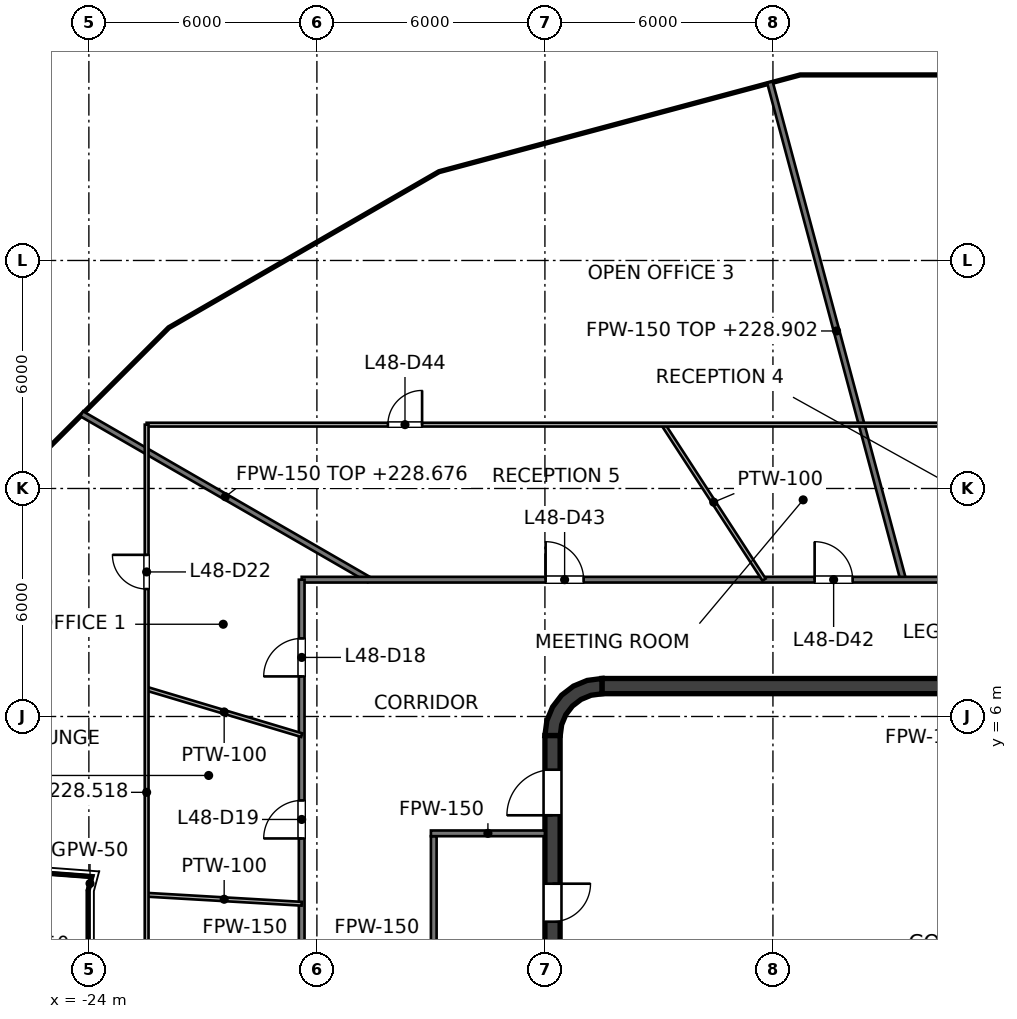
"""IFC4 building model, lengths in metres.
Left out: names, types, materials, properties, quantities, classifications, styles, units other than length and angle.
Written with IfcOpenShell. Run it as: python <this file> out.ifc"""

import sys

from ifc_helpers import new_model, si_unit, direction, frame, frame_2d, origin, place, context, subcontext, project, spatial, polyline, rectangle, outline, extrude, element, fill, save


model = new_model("IFC4")
c1 = context("Model", 3, precision=1e-05, world=origin(), true_north=direction((0.0, 1.0)))
c2 = subcontext(c1, "Body", "Model", "MODEL_VIEW")
j1 = project(units=[si_unit("LENGTHUNIT", "METRE"), si_unit("PLANEANGLEUNIT", "RADIAN")], contexts=[c1])
p1 = place(None, origin())
s1 = spatial("IfcSite", under=j1, at=p1, CompositionType="ELEMENT")
p2 = place(p1, origin())
s2 = spatial("IfcBuilding", under=s1, at=p2, CompositionType="ELEMENT")
p3 = place(p2, frame((0.0, 0.0, 225.6)))
s3 = spatial("IfcBuildingStorey", under=s2, at=p3, CompositionType="ELEMENT", Elevation=225.6)
p4 = place(p3, frame((-10.5, 6.8, 0.0), z_axis=(0.0, 0.0, 1.0), x_axis=(1.0, 0.0, 0.0)))
e1 = element("IfcWall", 1, at=p4, inside=s3, PredefinedType="SHEAR", context=c2, shape_type="SweptSolid", body=[
    extrude(rectangle(XDim=21.0, YDim=0.4, at=frame_2d((10.5, 0.0))), origin(), (0.0, 0.0, 1.0), 4.0),
])
p5 = place(p3, frame((-11.8, -5.5, 0.0), z_axis=(0.0, 0.0, 1.0), x_axis=(0.0, 1.0, 0.0)))
e2 = element("IfcWall", 2, at=p5, inside=s3, PredefinedType="SHEAR", context=c2, shape_type="SweptSolid", body=[
    extrude(rectangle(XDim=11.0, YDim=0.4, at=frame_2d((5.5, 0.0))), origin(), (0.0, 0.0, 1.0), 4.0),
])
p6 = place(p5, frame((3.2, 0.0, 0.0)))
e3 = element("IfcOpeningElement", 3, at=p6, cuts=e2, PredefinedType="OPENING", context=c2, shape_type="SweptSolid", body=[
    extrude(rectangle(XDim=1.0, YDim=2.1, at=frame_2d((0.5, 1.05))), frame((0.0, 0.2, 0.0), z_axis=(0.0, -1.0, 0.0), x_axis=(1.0, 0.0, 0.0)), (0.0, 0.0, 1.0), 0.4),
])
p7 = place(p5, frame((6.1, 0.0, 0.0)))
e4 = element("IfcOpeningElement", 4, at=p7, cuts=e2, PredefinedType="OPENING", context=c2, shape_type="SweptSolid", body=[
    extrude(rectangle(XDim=1.0, YDim=2.1, at=frame_2d((0.5, 1.05))), frame((0.0, 0.2, 0.0), z_axis=(0.0, -1.0, 0.0), x_axis=(1.0, 0.0, 0.0)), (0.0, 0.0, 1.0), 0.4),
])
p8 = place(p5, frame((0.9, 0.0, 0.0)))
e5 = element("IfcOpeningElement", 5, at=p8, cuts=e2, PredefinedType="OPENING", context=c2, shape_type="SweptSolid", body=[
    extrude(rectangle(XDim=1.2, YDim=2.1, at=frame_2d((0.6, 1.05))), frame((0.0, 0.2, 0.0), z_axis=(0.0, -1.0, 0.0), x_axis=(1.0, 0.0, 0.0)), (0.0, 0.0, 1.0), 0.4),
])
p9 = place(p5, frame((8.9, 0.0, 0.0)))
e6 = element("IfcOpeningElement", 6, at=p9, cuts=e2, PredefinedType="OPENING", context=c2, shape_type="SweptSolid", body=[
    extrude(rectangle(XDim=1.2, YDim=2.1, at=frame_2d((0.6, 1.05))), frame((0.0, 0.2, 0.0), z_axis=(0.0, -1.0, 0.0), x_axis=(1.0, 0.0, 0.0)), (0.0, 0.0, 1.0), 0.4),
])
p10 = place(p3, origin())
e7 = element("IfcWall", 7, at=p10, inside=s3, PredefinedType="SHEAR", context=c2, shape_type="SweptSolid", body=[
    extrude(outline(polyline([(-12.0, 5.5), (-11.596, 5.5), (-11.559, 5.784), (-11.45, 6.048), (-11.275, 6.275), (-11.048, 6.45), (-10.784, 6.559), (-10.5, 6.596), (-10.5, 7.0), (-10.888, 6.949), (-11.25, 6.799), (-11.561, 6.561), (-11.799, 6.25), (-11.949, 5.888), (-12.0, 5.5)])), origin(), (0.0, 0.0, 1.0), 4.0),
])
p11 = place(p3, frame((-9.0, 4.1, 0.0), z_axis=(0.0, 0.0, 1.0), x_axis=(0.0, 1.0, 0.0)))
e8 = element("IfcWall", 8, at=p11, inside=s3, PredefinedType="SOLIDWALL", context=c2, shape_type="SweptSolid", body=[
    extrude(rectangle(XDim=2.5, YDim=0.25, at=frame_2d((1.25, 0.0))), origin(), (0.0, 0.0, 1.0), 3.85),
])
p12 = place(p11, frame((0.65, 0.0, 0.0)))
e9 = element("IfcOpeningElement", 9, at=p12, cuts=e8, PredefinedType="OPENING", context=c2, shape_type="SweptSolid", body=[
    extrude(rectangle(XDim=1.2, YDim=2.1, at=frame_2d((0.6, 1.05))), frame((0.0, 0.125, 0.0), z_axis=(0.0, -1.0, 0.0), x_axis=(1.0, 0.0, 0.0)), (0.0, 0.0, 1.0), 0.25),
])
p13 = place(p3, frame((-3.15, 4.1, 0.0), z_axis=(0.0, 0.0, 1.0), x_axis=(0.0, 1.0, 0.0)))
e10 = element("IfcWall", 10, at=p13, inside=s3, PredefinedType="SOLIDWALL", context=c2, shape_type="SweptSolid", body=[
    extrude(rectangle(XDim=2.5, YDim=0.25, at=frame_2d((1.25, 0.0))), origin(), (0.0, 0.0, 1.0), 3.85),
])
p14 = place(p3, frame((-9.125, 1.525, 0.0), z_axis=(0.0, 0.0, 1.0), x_axis=(1.0, 0.0, 0.0)))
e11 = element("IfcWall", 11, at=p14, inside=s3, PredefinedType="SOLIDWALL", context=c2, shape_type="SweptSolid", body=[
    extrude(rectangle(XDim=8.35, YDim=0.25, at=frame_2d((4.175, 0.0))), origin(), (0.0, 0.0, 1.0), 3.85),
])
p15 = place(p14, frame((0.925, 0.0, 0.0)))
e12 = element("IfcOpeningElement", 12, at=p15, cuts=e11, PredefinedType="OPENING", context=c2, shape_type="SweptSolid", body=[
    extrude(rectangle(XDim=1.1, YDim=2.1, at=frame_2d((0.55, 1.05))), frame((0.0, 0.125, 0.0), z_axis=(0.0, -1.0, 0.0), x_axis=(1.0, 0.0, 0.0)), (0.0, 0.0, 1.0), 0.25),
])
p16 = place(p14, frame((3.625, 0.0, 0.0)))
e13 = element("IfcOpeningElement", 13, at=p16, cuts=e11, PredefinedType="OPENING", context=c2, shape_type="SweptSolid", body=[
    extrude(rectangle(XDim=1.1, YDim=2.1, at=frame_2d((0.55, 1.05))), frame((0.0, 0.125, 0.0), z_axis=(0.0, -1.0, 0.0), x_axis=(1.0, 0.0, 0.0)), (0.0, 0.0, 1.0), 0.25),
])
p17 = place(p14, frame((6.325, 0.0, 0.0)))
e14 = element("IfcOpeningElement", 14, at=p17, cuts=e11, PredefinedType="OPENING", context=c2, shape_type="SweptSolid", body=[
    extrude(rectangle(XDim=1.1, YDim=2.1, at=frame_2d((0.55, 1.05))), frame((0.0, 0.125, 0.0), z_axis=(0.0, -1.0, 0.0), x_axis=(1.0, 0.0, 0.0)), (0.0, 0.0, 1.0), 0.25),
])
p18 = place(p3, frame((-9.125, 3.975, 0.0), z_axis=(0.0, 0.0, 1.0), x_axis=(1.0, 0.0, 0.0)))
e15 = element("IfcWall", 15, at=p18, inside=s3, PredefinedType="SOLIDWALL", context=c2, shape_type="SweptSolid", body=[
    extrude(rectangle(XDim=8.35, YDim=0.25, at=frame_2d((4.175, 0.0))), origin(), (0.0, 0.0, 1.0), 3.85),
])
for number, where, z_axis, x_axis in (
    (16, (-9.0, 1.65, 0.0), (0.0, 0.0, 1.0), (0.0, 1.0, 0.0)),
    (17, (-6.3, 1.65, 0.0), (0.0, 0.0, 1.0), (0.0, 1.0, 0.0)),
    (18, (-3.6, 1.65, 0.0), (0.0, 0.0, 1.0), (0.0, 1.0, 0.0)),
):
    element("IfcWall", number, at=place(p3, frame(where, z_axis=z_axis, x_axis=x_axis)), inside=s3, PredefinedType="SOLIDWALL", context=c2, shape_type="SweptSolid", body=[
        extrude(rectangle(XDim=2.2, YDim=0.25, at=frame_2d((1.1, 0.0))), origin(), (0.0, 0.0, 1.0), 3.85),
    ])
p19 = place(p3, frame((-14.925, -2.85, 0.0), z_axis=(0.0, 0.0, 1.0), x_axis=(0.0, 1.0, 0.0)))
e19 = element("IfcWall", 19, at=p19, inside=s3, PredefinedType="PARTITIONING", context=c2, shape_type="SweptSolid", body=[
    extrude(rectangle(XDim=5.7, YDim=0.15, at=frame_2d((2.85, 0.0))), origin(), (0.0, 0.0, 1.0), 2.918),
])
p20 = place(p3, frame((-15.0, 2.925, 0.0), z_axis=(0.0, 0.0, 1.0), x_axis=(1.0, 0.0, 0.0)))
e20 = element("IfcWall", 20, at=p20, inside=s3, PredefinedType="PARTITIONING", context=c2, shape_type="SweptSolid", body=[
    extrude(rectangle(XDim=3.0, YDim=0.15, at=frame_2d((1.5, 0.0))), origin(), (0.0, 0.0, 1.0), 2.918),
])
p21 = place(p3, frame((-6.08, 22.69, 0.0), z_axis=(0.0, 0.0, 1.0), x_axis=(0.258842041415, -0.965919664152, 0.0)))
e21 = element("IfcWall", 21, at=p21, inside=s3, PredefinedType="PARTITIONING", context=c2, shape_type="SweptSolid", body=[
    extrude(rectangle(XDim=13.552, YDim=0.15, at=frame_2d((6.776, 0.0))), origin(), (0.0, 0.0, 1.0), 3.302),
])
p22 = place(p3, frame((-24.19, 13.966, 0.0), z_axis=(0.0, 0.0, 1.0), x_axis=(0.866042650443, -0.499970126722, 0.0)))
e22 = element("IfcWall", 22, at=p22, inside=s3, PredefinedType="PARTITIONING", context=c2, shape_type="SweptSolid", body=[
    extrude(rectangle(XDim=8.732, YDim=0.15, at=frame_2d((4.366, 0.0))), origin(), (0.0, 0.0, 1.0), 3.076),
])
p23 = place(p3, frame((-18.4, 9.6, 0.0), z_axis=(0.0, 0.0, 1.0), x_axis=(1.0, 0.0, 0.0)))
e23 = element("IfcWall", 23, at=p23, inside=s3, PredefinedType="PARTITIONING", context=c2, shape_type="SweptSolid", body=[
    extrude(rectangle(XDim=36.8, YDim=0.15, at=frame_2d((18.4, 0.0))), origin(), (0.0, 0.0, 1.0), 2.927),
])
p24 = place(p23, frame((30.793, 0.0, 0.0)))
e24 = element("IfcOpeningElement", 24, at=p24, cuts=e23, PredefinedType="OPENING", context=c2, shape_type="SweptSolid", body=[
    extrude(rectangle(XDim=1.0, YDim=2.1, at=frame_2d((0.5, 1.05))), frame((0.0, 0.075, 0.0), z_axis=(0.0, -1.0, 0.0), x_axis=(1.0, 0.0, 0.0)), (0.0, 0.0, 1.0), 0.15),
])
p25 = place(p23, frame((24.84, 0.0, 0.0)))
e25 = element("IfcOpeningElement", 25, at=p25, cuts=e23, PredefinedType="OPENING", context=c2, shape_type="SweptSolid", body=[
    extrude(rectangle(XDim=1.0, YDim=2.1, at=frame_2d((0.5, 1.05))), frame((0.0, 0.075, 0.0), z_axis=(0.0, -1.0, 0.0), x_axis=(1.0, 0.0, 0.0)), (0.0, 0.0, 1.0), 0.15),
])
p26 = place(p23, frame((21.106, 0.0, 0.0)))
e26 = element("IfcOpeningElement", 26, at=p26, cuts=e23, PredefinedType="OPENING", context=c2, shape_type="SweptSolid", body=[
    extrude(rectangle(XDim=1.0, YDim=2.1, at=frame_2d((0.5, 1.05))), frame((0.0, 0.075, 0.0), z_axis=(0.0, -1.0, 0.0), x_axis=(1.0, 0.0, 0.0)), (0.0, 0.0, 1.0), 0.15),
])
p27 = place(p23, frame((17.46, 0.0, 0.0)))
e27 = element("IfcOpeningElement", 27, at=p27, cuts=e23, PredefinedType="OPENING", context=c2, shape_type="SweptSolid", body=[
    extrude(rectangle(XDim=1.0, YDim=2.1, at=frame_2d((0.5, 1.05))), frame((0.0, 0.075, 0.0), z_axis=(0.0, -1.0, 0.0), x_axis=(1.0, 0.0, 0.0)), (0.0, 0.0, 1.0), 0.15),
])
p28 = place(p23, frame((13.497, 0.0, 0.0)))
e28 = element("IfcOpeningElement", 28, at=p28, cuts=e23, PredefinedType="OPENING", context=c2, shape_type="SweptSolid", body=[
    extrude(rectangle(XDim=1.0, YDim=2.1, at=frame_2d((0.5, 1.05))), frame((0.0, 0.075, 0.0), z_axis=(0.0, -1.0, 0.0), x_axis=(1.0, 0.0, 0.0)), (0.0, 0.0, 1.0), 0.15),
])
p29 = place(p23, frame((6.418, 0.0, 0.0)))
e29 = element("IfcOpeningElement", 29, at=p29, cuts=e23, PredefinedType="OPENING", context=c2, shape_type="SweptSolid", body=[
    extrude(rectangle(XDim=1.0, YDim=2.1, at=frame_2d((0.5, 1.05))), frame((0.0, 0.075, 0.0), z_axis=(0.0, -1.0, 0.0), x_axis=(1.0, 0.0, 0.0)), (0.0, 0.0, 1.0), 0.15),
])
p30 = place(p3, frame((-18.4, -9.6, 0.0), z_axis=(0.0, 0.0, 1.0), x_axis=(0.0, 1.0, 0.0)))
e30 = element("IfcWall", 30, at=p30, inside=s3, PredefinedType="PARTITIONING", context=c2, shape_type="SweptSolid", body=[
    extrude(rectangle(XDim=19.2, YDim=0.15, at=frame_2d((9.6, 0.0))), origin(), (0.0, 0.0, 1.0), 2.918),
])
p31 = place(p30, frame((16.655, 0.0, 0.0)))
e31 = element("IfcOpeningElement", 31, at=p31, cuts=e30, PredefinedType="OPENING", context=c2, shape_type="SweptSolid", body=[
    extrude(rectangle(XDim=1.0, YDim=2.1, at=frame_2d((0.5, 1.05))), frame((0.0, 0.075, 0.0), z_axis=(0.0, -1.0, 0.0), x_axis=(1.0, 0.0, 0.0)), (0.0, 0.0, 1.0), 0.15),
])
p32 = place(p30, frame((12.39, 0.0, 0.0)))
e32 = element("IfcOpeningElement", 32, at=p32, cuts=e30, PredefinedType="OPENING", context=c2, shape_type="SweptSolid", body=[
    extrude(rectangle(XDim=1.0, YDim=2.1, at=frame_2d((0.5, 1.05))), frame((0.0, 0.075, 0.0), z_axis=(0.0, -1.0, 0.0), x_axis=(1.0, 0.0, 0.0)), (0.0, 0.0, 1.0), 0.15),
])
p33 = place(p30, frame((7.963, 0.0, 0.0)))
e33 = element("IfcOpeningElement", 33, at=p33, cuts=e30, PredefinedType="OPENING", context=c2, shape_type="SweptSolid", body=[
    extrude(rectangle(XDim=1.0, YDim=2.1, at=frame_2d((0.5, 1.05))), frame((0.0, 0.075, 0.0), z_axis=(0.0, -1.0, 0.0), x_axis=(1.0, 0.0, 0.0)), (0.0, 0.0, 1.0), 0.15),
])
p34 = place(p30, frame((2.627, 0.0, 0.0)))
e34 = element("IfcOpeningElement", 34, at=p34, cuts=e30, PredefinedType="OPENING", context=c2, shape_type="SweptSolid", body=[
    extrude(rectangle(XDim=1.0, YDim=2.1, at=frame_2d((0.5, 1.05))), frame((0.0, 0.075, 0.0), z_axis=(0.0, -1.0, 0.0), x_axis=(1.0, 0.0, 0.0)), (0.0, 0.0, 1.0), 0.15),
])
p35 = place(p3, frame((-30.519, 2.28, 0.0), z_axis=(0.0, 0.0, 1.0), x_axis=(0.997221144943, -0.074498242124, 0.0)))
e35 = element("IfcWall", 35, at=p35, inside=s3, PredefinedType="PARTITIONING", context=c2, shape_type="SweptSolid", body=[
    extrude(rectangle(XDim=6.616, YDim=0.05, at=frame_2d((3.308, 0.0))), origin(), (0.0, 0.0, 1.0), 2.918),
])
p36 = place(p3, frame((-24.019, 1.424, 0.0), z_axis=(0.0, 0.0, 1.0), x_axis=(0.260974429676, 0.96534571375, 0.0)))
e36 = element("IfcWall", 36, at=p36, inside=s3, PredefinedType="PARTITIONING", context=c2, shape_type="SweptSolid", body=[
    extrude(rectangle(XDim=0.376, YDim=0.05, at=frame_2d((0.188, 0.0))), origin(), (0.0, 0.0, 1.0), 2.918),
])
p37 = place(p3, frame((-24.019, -1.424, 0.0), z_axis=(0.0, 0.0, 1.0), x_axis=(0.0, 1.0, 0.0)))
e37 = element("IfcWall", 37, at=p37, inside=s3, PredefinedType="PARTITIONING", context=c2, shape_type="SweptSolid", body=[
    extrude(rectangle(XDim=2.848, YDim=0.05, at=frame_2d((1.424, 0.0))), origin(), (0.0, 0.0, 1.0), 3.85),
])
p38 = place(p3, frame((-8.884, 13.68, 0.0), z_axis=(0.0, 0.0, 1.0), x_axis=(0.544736088182, -0.838607532898, 0.0)))
e38 = element("IfcWall", 38, at=p38, inside=s3, PredefinedType="PARTITIONING", context=c2, shape_type="SweptSolid", body=[
    extrude(rectangle(XDim=4.865, YDim=0.1, at=frame_2d((2.433, 0.0))), origin(), (0.0, 0.0, 1.0), 3.85),
])
p39 = place(p3, frame((-22.48, 6.73, 0.0), z_axis=(0.0, 0.0, 1.0), x_axis=(0.958024854744, -0.286685154295, 0.0)))
e39 = element("IfcWall", 39, at=p39, inside=s3, PredefinedType="PARTITIONING", context=c2, shape_type="SweptSolid", body=[
    extrude(rectangle(XDim=4.259, YDim=0.1, at=frame_2d((2.129, 0.0))), origin(), (0.0, 0.0, 1.0), 3.85),
])
p40 = place(p3, frame((-22.48, 1.309, 0.0), z_axis=(0.0, 0.0, 1.0), x_axis=(0.998316342586, -0.058004138861, 0.0)))
e40 = element("IfcWall", 40, at=p40, inside=s3, PredefinedType="PARTITIONING", context=c2, shape_type="SweptSolid", body=[
    extrude(rectangle(XDim=4.087, YDim=0.1, at=frame_2d((2.043, 0.0))), origin(), (0.0, 0.0, 1.0), 3.85),
])
p41 = place(p3, frame((-22.48, 13.68, 0.0), z_axis=(0.0, 0.0, 1.0), x_axis=(1.0, 0.0, 0.0)))
e41 = element("IfcWall", 41, at=p41, inside=s3, PredefinedType="PARTITIONING", context=c2, shape_type="SweptSolid", body=[
    extrude(rectangle(XDim=44.96, YDim=0.1, at=frame_2d((22.48, 0.0))), origin(), (0.0, 0.0, 1.0), 2.927),
])
p42 = place(p41, frame((20.954, 0.0, 0.0)))
e42 = element("IfcOpeningElement", 42, at=p42, cuts=e41, PredefinedType="OPENING", context=c2, shape_type="SweptSolid", body=[
    extrude(rectangle(XDim=1.8, YDim=2.1, at=frame_2d((0.9, 1.05))), frame((0.0, 0.05, 0.0), z_axis=(0.0, -1.0, 0.0), x_axis=(1.0, 0.0, 0.0)), (0.0, 0.0, 1.0), 0.1),
])
p43 = place(p41, frame((6.348, 0.0, 0.0)))
e43 = element("IfcOpeningElement", 43, at=p43, cuts=e41, PredefinedType="OPENING", context=c2, shape_type="SweptSolid", body=[
    extrude(rectangle(XDim=0.9, YDim=2.1, at=frame_2d((0.45, 1.05))), frame((0.0, 0.05, 0.0), z_axis=(0.0, -1.0, 0.0), x_axis=(1.0, 0.0, 0.0)), (0.0, 0.0, 1.0), 0.1),
])
p44 = place(p3, frame((-22.48, -5.671, 0.0), z_axis=(0.0, 0.0, 1.0), x_axis=(0.0, 1.0, 0.0)))
e44 = element("IfcWall", 44, at=p44, inside=s3, PredefinedType="PARTITIONING", context=c2, shape_type="SweptSolid", body=[
    extrude(rectangle(XDim=19.351, YDim=0.1, at=frame_2d((9.675, 0.0))), origin(), (0.0, 0.0, 1.0), 2.918),
])
p45 = place(p44, frame((15.025, 0.0, 0.0)))
e45 = element("IfcOpeningElement", 45, at=p45, cuts=e44, PredefinedType="OPENING", context=c2, shape_type="SweptSolid", body=[
    extrude(rectangle(XDim=0.9, YDim=2.1, at=frame_2d((0.45, 1.05))), frame((0.0, 0.05, 0.0), z_axis=(0.0, -1.0, 0.0), x_axis=(1.0, 0.0, 0.0)), (0.0, 0.0, 1.0), 0.1),
])
p46 = place(p15, origin())
e46 = element("IfcDoor", 46, at=p46, inside=s3, OperationType="DOUBLE_DOOR_SLIDING", PredefinedType="DOOR", context=c2, shape_type="SweptSolid", body=[
    extrude(rectangle(XDim=1.1, YDim=2.1, at=frame_2d((0.55, 1.05))), frame((0.0, 0.025, 0.0), z_axis=(0.0, -1.0, 0.0), x_axis=(1.0, 0.0, 0.0)), (0.0, 0.0, 1.0), 0.05),
])
fill(e12, e46)
p47 = place(p16, origin())
e47 = element("IfcDoor", 47, at=p47, inside=s3, OperationType="DOUBLE_DOOR_SLIDING", PredefinedType="DOOR", context=c2, shape_type="SweptSolid", body=[
    extrude(rectangle(XDim=1.1, YDim=2.1, at=frame_2d((0.55, 1.05))), frame((0.0, 0.025, 0.0), z_axis=(0.0, -1.0, 0.0), x_axis=(1.0, 0.0, 0.0)), (0.0, 0.0, 1.0), 0.05),
])
fill(e13, e47)
p48 = place(p17, origin())
e48 = element("IfcDoor", 48, at=p48, inside=s3, OperationType="DOUBLE_DOOR_SLIDING", PredefinedType="DOOR", context=c2, shape_type="SweptSolid", body=[
    extrude(rectangle(XDim=1.1, YDim=2.1, at=frame_2d((0.55, 1.05))), frame((0.0, 0.025, 0.0), z_axis=(0.0, -1.0, 0.0), x_axis=(1.0, 0.0, 0.0)), (0.0, 0.0, 1.0), 0.05),
])
fill(e14, e48)
p49 = place(p12, origin())
e49 = element("IfcDoor", 49, at=p49, inside=s3, OperationType="SINGLE_SWING_RIGHT", PredefinedType="DOOR", context=c2, shape_type="SweptSolid", body=[
    extrude(rectangle(XDim=1.2, YDim=2.1, at=frame_2d((0.6, 1.05))), frame((0.0, 0.025, 0.0), z_axis=(0.0, -1.0, 0.0), x_axis=(1.0, 0.0, 0.0)), (0.0, 0.0, 1.0), 0.05),
])
fill(e9, e49)
p50 = place(p7, origin())
e50 = element("IfcDoor", 50, at=p50, inside=s3, OperationType="SINGLE_SWING_RIGHT", PredefinedType="DOOR", context=c2, shape_type="SweptSolid", body=[
    extrude(rectangle(XDim=1.0, YDim=2.1, at=frame_2d((0.5, 1.05))), frame((0.0, 0.025, 0.0), z_axis=(0.0, -1.0, 0.0), x_axis=(1.0, 0.0, 0.0)), (0.0, 0.0, 1.0), 0.05),
])
fill(e4, e50)
p51 = place(p9, origin())
e51 = element("IfcDoor", 51, at=p51, inside=s3, OperationType="SINGLE_SWING_LEFT", PredefinedType="DOOR", context=c2, shape_type="SweptSolid", body=[
    extrude(rectangle(XDim=1.2, YDim=2.1, at=frame_2d((0.6, 1.05))), frame((0.0, 0.025, 0.0), z_axis=(0.0, -1.0, 0.0), x_axis=(1.0, 0.0, 0.0)), (0.0, 0.0, 1.0), 0.05),
])
fill(e6, e51)
p52 = place(p31, origin())
e52 = element("IfcDoor", 52, at=p52, inside=s3, OperationType="SINGLE_SWING_LEFT", PredefinedType="DOOR", context=c2, shape_type="SweptSolid", body=[
    extrude(rectangle(XDim=1.0, YDim=2.1, at=frame_2d((0.5, 1.05))), frame((0.0, 0.025, 0.0), z_axis=(0.0, -1.0, 0.0), x_axis=(1.0, 0.0, 0.0)), (0.0, 0.0, 1.0), 0.05),
])
fill(e31, e52)
p53 = place(p32, origin())
e53 = element("IfcDoor", 53, at=p53, inside=s3, OperationType="SINGLE_SWING_LEFT", PredefinedType="DOOR", context=c2, shape_type="SweptSolid", body=[
    extrude(rectangle(XDim=1.0, YDim=2.1, at=frame_2d((0.5, 1.05))), frame((0.0, 0.025, 0.0), z_axis=(0.0, -1.0, 0.0), x_axis=(1.0, 0.0, 0.0)), (0.0, 0.0, 1.0), 0.05),
])
fill(e32, e53)
p54 = place(p45, origin())
e54 = element("IfcDoor", 54, at=p54, inside=s3, OperationType="SINGLE_SWING_RIGHT", PredefinedType="DOOR", context=c2, shape_type="SweptSolid", body=[
    extrude(rectangle(XDim=0.9, YDim=2.1, at=frame_2d((0.45, 1.05))), frame((0.0, 0.025, 0.0), z_axis=(0.0, -1.0, 0.0), x_axis=(1.0, 0.0, 0.0)), (0.0, 0.0, 1.0), 0.05),
])
fill(e45, e54)
p55 = place(p28, origin())
e55 = element("IfcDoor", 55, at=p55, inside=s3, OperationType="SINGLE_SWING_LEFT", PredefinedType="DOOR", context=c2, shape_type="SweptSolid", body=[
    extrude(rectangle(XDim=1.0, YDim=2.1, at=frame_2d((0.5, 1.05))), frame((0.0, 0.025, 0.0), z_axis=(0.0, -1.0, 0.0), x_axis=(1.0, 0.0, 0.0)), (0.0, 0.0, 1.0), 0.05),
])
fill(e28, e55)
p56 = place(p29, origin())
e56 = element("IfcDoor", 56, at=p56, inside=s3, OperationType="SINGLE_SWING_LEFT", PredefinedType="DOOR", context=c2, shape_type="SweptSolid", body=[
    extrude(rectangle(XDim=1.0, YDim=2.1, at=frame_2d((0.5, 1.05))), frame((0.0, 0.025, 0.0), z_axis=(0.0, -1.0, 0.0), x_axis=(1.0, 0.0, 0.0)), (0.0, 0.0, 1.0), 0.05),
])
fill(e29, e56)
p57 = place(p43, origin())
e57 = element("IfcDoor", 57, at=p57, inside=s3, OperationType="SINGLE_SWING_RIGHT", PredefinedType="DOOR", context=c2, shape_type="SweptSolid", body=[
    extrude(rectangle(XDim=0.9, YDim=2.1, at=frame_2d((0.45, 1.05))), frame((0.0, 0.025, 0.0), z_axis=(0.0, -1.0, 0.0), x_axis=(1.0, 0.0, 0.0)), (0.0, 0.0, 1.0), 0.05),
])
fill(e43, e57)
save(model, sys.argv[1])
